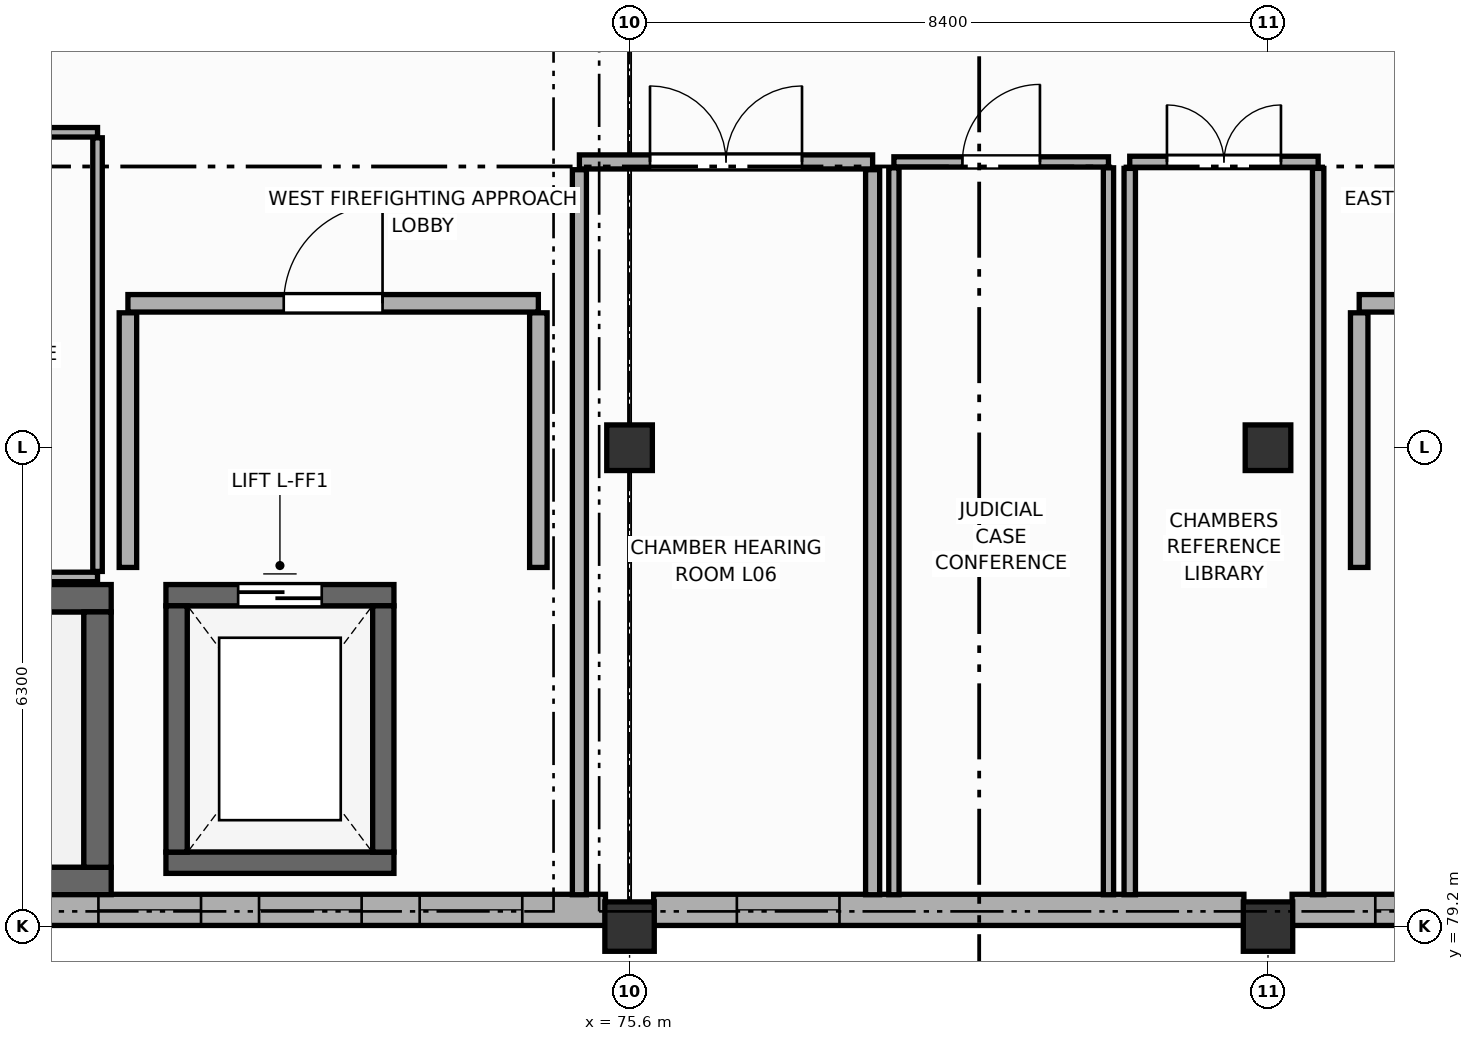
"""IFC4 building model, lengths in metres.
Left out: names, types, materials, properties, quantities, classifications, styles, units other than length and angle.
Written with IfcOpenShell. Run it as: python <this file> out.ifc"""

import sys

from ifc_helpers import new_model, si_unit, direction, frame, frame_2d, origin, origin_2d, place, context, subcontext, project, spatial, rectangle, extrude, element, fill, save


model = new_model("IFC4")
c1 = context("Model", 3, precision=1e-05, world=origin(), true_north=direction((0.0, 1.0)))
c2 = subcontext(c1, "Body", "Model", "MODEL_VIEW")
j1 = project(units=[si_unit("LENGTHUNIT", "METRE"), si_unit("PLANEANGLEUNIT", "RADIAN")], contexts=[c1])
p1 = place(None, origin())
s1 = spatial("IfcSite", under=j1, at=p1, CompositionType="ELEMENT")
p2 = place(p1, origin())
s2 = spatial("IfcBuilding", under=s1, at=p2, CompositionType="ELEMENT")
p3 = place(p2, frame((0.0, 0.0, 22.8)))
s3 = spatial("IfcBuildingStorey", under=s2, at=p3, CompositionType="ELEMENT", Elevation=22.8)
p4 = place(p3, frame((75.6, 79.2, 0.0), z_axis=(0.0, 0.0, 1.0), x_axis=(1.0, 0.0, 0.0)))
e1 = element("IfcColumn", 1, at=p4, inside=s3, PredefinedType="COLUMN", context=c2, shape_type="SweptSolid", body=[
    extrude(rectangle(XDim=0.65, YDim=0.65, at=origin_2d()), origin(), (0.0, 0.0, 1.0), 4.2),
])
p5 = place(p3, frame((75.6, 85.5, 0.0), z_axis=(0.0, 0.0, 1.0), x_axis=(1.0, 0.0, 0.0)))
e2 = element("IfcColumn", 2, at=p5, inside=s3, PredefinedType="COLUMN", context=c2, shape_type="SweptSolid", body=[
    extrude(rectangle(XDim=0.6, YDim=0.6, at=origin_2d()), origin(), (0.0, 0.0, 1.0), 4.2),
])
p6 = place(p3, frame((84.0, 79.2, 0.0), z_axis=(0.0, 0.0, 1.0), x_axis=(1.0, 0.0, 0.0)))
e3 = element("IfcColumn", 3, at=p6, inside=s3, PredefinedType="COLUMN", context=c2, shape_type="SweptSolid", body=[
    extrude(rectangle(XDim=0.65, YDim=0.65, at=origin_2d()), origin(), (0.0, 0.0, 1.0), 4.2),
])
p7 = place(p3, frame((84.0, 85.5, 0.0), z_axis=(0.0, 0.0, 1.0), x_axis=(1.0, 0.0, 0.0)))
e4 = element("IfcColumn", 4, at=p7, inside=s3, PredefinedType="COLUMN", context=c2, shape_type="SweptSolid", body=[
    extrude(rectangle(XDim=0.6, YDim=0.6, at=origin_2d()), origin(), (0.0, 0.0, 1.0), 4.2),
])
p8 = place(p3, frame((75.283, 79.42, 0.0), z_axis=(0.0, 0.0, 1.0), x_axis=(-1.0, 0.0, 0.0)))
e5 = element("IfcWall", 5, at=p8, inside=s3, PredefinedType="STANDARD", context=c2, shape_type="SweptSolid", body=[
    extrude(rectangle(XDim=7.766, YDim=0.41, at=frame_2d((3.883, 0.0))), origin(), (0.0, 0.0, 1.0), 3.5),
])
p9 = place(p8, frame((1.095, 0.0, 0.85)))
e6 = element("IfcOpeningElement", 6, at=p9, cuts=e5, PredefinedType="OPENING", context=c2, shape_type="SweptSolid", body=[
    extrude(rectangle(XDim=1.35, YDim=1.95, at=frame_2d((0.675, 0.975))), frame((0.0, 0.215, 0.0), z_axis=(0.0, -1.0, 0.0), x_axis=(1.0, 0.0, 0.0)), (0.0, 0.0, 1.0), 0.43),
])
p10 = place(p8, frame((3.208, 0.0, 0.85)))
e7 = element("IfcOpeningElement", 7, at=p10, cuts=e5, PredefinedType="OPENING", context=c2, shape_type="SweptSolid", body=[
    extrude(rectangle(XDim=1.35, YDim=1.95, at=frame_2d((0.675, 0.975))), frame((0.0, 0.215, 0.0), z_axis=(0.0, -1.0, 0.0), x_axis=(1.0, 0.0, 0.0)), (0.0, 0.0, 1.0), 0.43),
])
p11 = place(p8, frame((5.321, 0.0, 0.85)))
e8 = element("IfcOpeningElement", 8, at=p11, cuts=e5, PredefinedType="OPENING", context=c2, shape_type="SweptSolid", body=[
    extrude(rectangle(XDim=1.35, YDim=1.95, at=frame_2d((0.675, 0.975))), frame((0.0, 0.215, 0.0), z_axis=(0.0, -1.0, 0.0), x_axis=(1.0, 0.0, 0.0)), (0.0, 0.0, 1.0), 0.43),
])
p12 = place(p3, frame((83.683, 79.42, 0.0), z_axis=(0.0, 0.0, 1.0), x_axis=(-1.0, 0.0, 0.0)))
e9 = element("IfcWall", 9, at=p12, inside=s3, PredefinedType="STANDARD", context=c2, shape_type="SweptSolid", body=[
    extrude(rectangle(XDim=7.766, YDim=0.41, at=frame_2d((3.883, 0.0))), origin(), (0.0, 0.0, 1.0), 3.5),
])
p13 = place(p12, frame((5.321, 0.0, 0.85)))
e10 = element("IfcOpeningElement", 10, at=p13, cuts=e9, PredefinedType="OPENING", context=c2, shape_type="SweptSolid", body=[
    extrude(rectangle(XDim=1.35, YDim=1.95, at=frame_2d((0.675, 0.975))), frame((0.0, 0.215, 0.0), z_axis=(0.0, -1.0, 0.0), x_axis=(1.0, 0.0, 0.0)), (0.0, 0.0, 1.0), 0.43),
])
p14 = place(p3, frame((92.083, 79.42, 0.0), z_axis=(0.0, 0.0, 1.0), x_axis=(-1.0, 0.0, 0.0)))
e11 = element("IfcWall", 11, at=p14, inside=s3, PredefinedType="STANDARD", context=c2, shape_type="SweptSolid", body=[
    extrude(rectangle(XDim=7.766, YDim=0.41, at=frame_2d((3.883, 0.0))), origin(), (0.0, 0.0, 1.0), 3.5),
])
p15 = place(p14, frame((1.095, 0.0, 0.85)))
e12 = element("IfcOpeningElement", 12, at=p15, cuts=e11, PredefinedType="OPENING", context=c2, shape_type="SweptSolid", body=[
    extrude(rectangle(XDim=1.35, YDim=1.95, at=frame_2d((0.675, 0.975))), frame((0.0, 0.215, 0.0), z_axis=(0.0, -1.0, 0.0), x_axis=(1.0, 0.0, 0.0)), (0.0, 0.0, 1.0), 0.43),
])
p16 = place(p14, frame((3.208, 0.0, 0.85)))
e13 = element("IfcOpeningElement", 13, at=p16, cuts=e11, PredefinedType="OPENING", context=c2, shape_type="SweptSolid", body=[
    extrude(rectangle(XDim=1.35, YDim=1.95, at=frame_2d((0.675, 0.975))), frame((0.0, 0.215, 0.0), z_axis=(0.0, -1.0, 0.0), x_axis=(1.0, 0.0, 0.0)), (0.0, 0.0, 1.0), 0.43),
])
p17 = place(p14, frame((5.321, 0.0, 0.85)))
e14 = element("IfcOpeningElement", 14, at=p17, cuts=e11, PredefinedType="OPENING", context=c2, shape_type="SweptSolid", body=[
    extrude(rectangle(XDim=1.35, YDim=1.95, at=frame_2d((0.675, 0.975))), frame((0.0, 0.215, 0.0), z_axis=(0.0, -1.0, 0.0), x_axis=(1.0, 0.0, 0.0)), (0.0, 0.0, 1.0), 0.43),
])
for number, where, z_axis, x_axis in (
    (15, (59.42, 83.52, 0.0), (0.0, 0.0, 1.0), (1.0, 0.0, 0.0)),
    (16, (68.78, 79.8, 0.0), (0.0, 0.0, 1.0), (-1.0, 0.0, 0.0)),
):
    element("IfcWall", number, at=place(p3, frame(where, z_axis=z_axis, x_axis=x_axis)), inside=s3, PredefinedType="SHEAR", context=c2, shape_type="SweptSolid", body=[
        extrude(rectangle(XDim=9.36, YDim=0.36, at=frame_2d((4.68, 0.0))), origin(), (0.0, 0.0, 1.0), 3.97),
    ])
p18 = place(p3, frame((68.6, 83.34, 0.0), z_axis=(0.0, 0.0, 1.0), x_axis=(0.0, -1.0, 0.0)))
e17 = element("IfcWall", 17, at=p18, inside=s3, PredefinedType="SHEAR", context=c2, shape_type="SweptSolid", body=[
    extrude(rectangle(XDim=3.36, YDim=0.36, at=frame_2d((1.68, 0.0))), origin(), (0.0, 0.0, 1.0), 3.97),
])
p19 = place(p3, frame((69.5, 83.56, 0.0), z_axis=(0.0, 0.0, 1.0), x_axis=(1.0, 0.0, 0.0)))
e18 = element("IfcWall", 18, at=p19, inside=s3, PredefinedType="SHEAR", context=c2, shape_type="SweptSolid", body=[
    extrude(rectangle(XDim=3.0, YDim=0.28, at=frame_2d((1.5, 0.0))), origin(), (0.0, 0.0, 1.0), 3.97),
])
p20 = place(p19, frame((0.95, 0.0, 0.0)))
e19 = element("IfcOpeningElement", 19, at=p20, cuts=e18, PredefinedType="OPENING", context=c2, shape_type="SweptSolid", body=[
    extrude(rectangle(XDim=1.1, YDim=2.2, at=frame_2d((0.55, 1.1))), frame((0.0, 0.15, 0.0), z_axis=(0.0, -1.0, 0.0), x_axis=(1.0, 0.0, 0.0)), (0.0, 0.0, 1.0), 0.3),
])
p21 = place(p3, frame((72.5, 80.04, 0.0), z_axis=(0.0, 0.0, 1.0), x_axis=(-1.0, 0.0, 0.0)))
e20 = element("IfcWall", 20, at=p21, inside=s3, PredefinedType="SHEAR", context=c2, shape_type="SweptSolid", body=[
    extrude(rectangle(XDim=3.0, YDim=0.28, at=frame_2d((1.5, 0.0))), origin(), (0.0, 0.0, 1.0), 3.97),
])
for number, where, z_axis, x_axis in (
    (21, (69.64, 80.18, 0.0), (0.0, 0.0, 1.0), (0.0, 1.0, 0.0)),
    (22, (72.36, 83.42, 0.0), (0.0, 0.0, 1.0), (0.0, -1.0, 0.0)),
):
    element("IfcWall", number, at=place(p3, frame(where, z_axis=z_axis, x_axis=x_axis)), inside=s3, PredefinedType="SHEAR", context=c2, shape_type="SweptSolid", body=[
        extrude(rectangle(XDim=3.24, YDim=0.28, at=frame_2d((1.62, 0.0))), origin(), (0.0, 0.0, 1.0), 3.97),
    ])
p22 = place(p3, frame((69.0, 87.4, 0.0), z_axis=(0.0, 0.0, 1.0), x_axis=(1.0, 0.0, 0.0)))
e23 = element("IfcWall", 23, at=p22, inside=s3, PredefinedType="STANDARD", context=c2, shape_type="SweptSolid", body=[
    extrude(rectangle(XDim=5.4, YDim=0.23, at=frame_2d((2.7, 0.0))), origin(), (0.0, 0.0, 1.0), 3.955),
])
p23 = place(p22, frame((2.05, 0.0, 0.0)))
e24 = element("IfcOpeningElement", 24, at=p23, cuts=e23, PredefinedType="OPENING", context=c2, shape_type="SweptSolid", body=[
    extrude(rectangle(XDim=1.3, YDim=2.2, at=frame_2d((0.65, 1.1))), frame((0.0, 0.125, 0.0), z_axis=(0.0, -1.0, 0.0), x_axis=(1.0, 0.0, 0.0)), (0.0, 0.0, 1.0), 0.25),
])
for number, where, z_axis, x_axis in (
    (25, (69.0, 83.925, 0.0), (0.0, 0.0, 1.0), (0.0, 1.0, 0.0)),
    (26, (74.4, 87.275, 0.0), (0.0, 0.0, 1.0), (0.0, -1.0, 0.0)),
):
    element("IfcWall", number, at=place(p3, frame(where, z_axis=z_axis, x_axis=x_axis)), inside=s3, PredefinedType="STANDARD", context=c2, shape_type="SweptSolid", body=[
        extrude(rectangle(XDim=3.35, YDim=0.23, at=frame_2d((1.675, 0.0))), origin(), (0.0, 0.0, 1.0), 3.4),
    ])
p24 = place(p3, frame((85.2, 87.4, 0.0), z_axis=(0.0, 0.0, 1.0), x_axis=(1.0, 0.0, 0.0)))
e27 = element("IfcWall", 27, at=p24, inside=s3, PredefinedType="STANDARD", context=c2, shape_type="SweptSolid", body=[
    extrude(rectangle(XDim=5.4, YDim=0.23, at=frame_2d((2.7, 0.0))), origin(), (0.0, 0.0, 1.0), 3.955),
])
p25 = place(p24, frame((2.05, 0.0, 0.0)))
e28 = element("IfcOpeningElement", 28, at=p25, cuts=e27, PredefinedType="OPENING", context=c2, shape_type="SweptSolid", body=[
    extrude(rectangle(XDim=1.3, YDim=2.2, at=frame_2d((0.65, 1.1))), frame((0.0, 0.125, 0.0), z_axis=(0.0, -1.0, 0.0), x_axis=(1.0, 0.0, 0.0)), (0.0, 0.0, 1.0), 0.25),
])
p26 = place(p3, frame((85.2, 83.925, 0.0), z_axis=(0.0, 0.0, 1.0), x_axis=(0.0, 1.0, 0.0)))
e29 = element("IfcWall", 29, at=p26, inside=s3, PredefinedType="STANDARD", context=c2, shape_type="SweptSolid", body=[
    extrude(rectangle(XDim=3.35, YDim=0.23, at=frame_2d((1.675, 0.0))), origin(), (0.0, 0.0, 1.0), 3.4),
])
p27 = place(p3, frame((66.0, 89.65, 0.0), z_axis=(0.0, 0.0, 1.0), x_axis=(1.0, 0.0, 0.0)))
e30 = element("IfcWall", 30, at=p27, inside=s3, PredefinedType="PARTITIONING", context=c2, shape_type="SweptSolid", body=[
    extrude(rectangle(XDim=2.6, YDim=0.125, at=frame_2d((1.3, 0.0))), origin(), (0.0, 0.0, 1.0), 3.5),
])
p28 = place(p27, frame((0.8, 0.0, 0.0)))
e31 = element("IfcOpeningElement", 31, at=p28, cuts=e30, PredefinedType="OPENING", context=c2, shape_type="SweptSolid", body=[
    extrude(rectangle(XDim=1.0, YDim=2.1, at=frame_2d((0.5, 1.05))), frame((0.0, 0.073, 0.0), z_axis=(0.0, -1.0, 0.0), x_axis=(1.0, 0.0, 0.0)), (0.0, 0.0, 1.0), 0.145),
])
p29 = place(p3, frame((68.6, 83.8, 0.0), z_axis=(0.0, 0.0, 1.0), x_axis=(-1.0, 0.0, 0.0)))
e32 = element("IfcWall", 32, at=p29, inside=s3, PredefinedType="PARTITIONING", context=c2, shape_type="SweptSolid", body=[
    extrude(rectangle(XDim=2.6, YDim=0.125, at=frame_2d((1.3, 0.0))), origin(), (0.0, 0.0, 1.0), 3.5),
])
p30 = place(p3, frame((68.6, 89.577, 0.0), z_axis=(0.0, 0.0, 1.0), x_axis=(0.0, -1.0, 0.0)))
e33 = element("IfcWall", 33, at=p30, inside=s3, PredefinedType="PARTITIONING", context=c2, shape_type="SweptSolid", body=[
    extrude(rectangle(XDim=5.705, YDim=0.125, at=frame_2d((2.853, 0.0))), origin(), (0.0, 0.0, 1.0), 3.4),
])
p31 = place(p3, frame((74.94, 89.26, 0.0), z_axis=(0.0, 0.0, 1.0), x_axis=(1.0, 0.0, 0.0)))
e34 = element("IfcWall", 34, at=p31, inside=s3, PredefinedType="PARTITIONING", context=c2, shape_type="SweptSolid", body=[
    extrude(rectangle(XDim=3.858, YDim=0.185, at=frame_2d((1.929, 0.0))), origin(), (0.0, 0.0, 1.0), 3.5),
])
p32 = place(p31, frame((0.929, 0.0, 0.0)))
e35 = element("IfcOpeningElement", 35, at=p32, cuts=e34, PredefinedType="OPENING", context=c2, shape_type="SweptSolid", body=[
    extrude(rectangle(XDim=2.0, YDim=2.5, at=frame_2d((1.0, 1.25))), frame((0.0, 0.103, 0.0), z_axis=(0.0, -1.0, 0.0), x_axis=(1.0, 0.0, 0.0)), (0.0, 0.0, 1.0), 0.205),
])
for number, where, z_axis, x_axis in (
    (36, (74.94, 79.619, 0.0), (0.0, 0.0, 1.0), (0.0, 1.0, 0.0)),
    (37, (78.798, 89.157, 0.0), (0.0, 0.0, 1.0), (0.0, -1.0, 0.0)),
):
    element("IfcWall", number, at=place(p3, frame(where, z_axis=z_axis, x_axis=x_axis)), inside=s3, PredefinedType="PARTITIONING", context=c2, shape_type="SweptSolid", body=[
        extrude(rectangle(XDim=9.539, YDim=0.185, at=frame_2d((4.769, 0.0))), origin(), (0.0, 0.0, 1.0), 3.4),
    ])
p33 = place(p3, frame((79.078, 89.26, 0.0), z_axis=(0.0, 0.0, 1.0), x_axis=(1.0, 0.0, 0.0)))
e38 = element("IfcWall", 38, at=p33, inside=s3, PredefinedType="PARTITIONING", context=c2, shape_type="SweptSolid", body=[
    extrude(rectangle(XDim=2.823, YDim=0.135, at=frame_2d((1.412, 0.0))), origin(), (0.0, 0.0, 1.0), 3.955),
])
p34 = place(p33, frame((0.902, 0.0, 0.0)))
e39 = element("IfcOpeningElement", 39, at=p34, cuts=e38, PredefinedType="OPENING", context=c2, shape_type="SweptSolid", body=[
    extrude(rectangle(XDim=1.02, YDim=2.15, at=frame_2d((0.51, 1.075))), frame((0.0, 0.077, 0.0), z_axis=(0.0, -1.0, 0.0), x_axis=(1.0, 0.0, 0.0)), (0.0, 0.0, 1.0), 0.155),
])
for number, where, z_axis, x_axis in (
    (40, (79.078, 79.619, 0.0), (0.0, 0.0, 1.0), (0.0, 1.0, 0.0)),
    (41, (81.901, 89.183, 0.0), (0.0, 0.0, 1.0), (0.0, -1.0, 0.0)),
):
    element("IfcWall", number, at=place(p3, frame(where, z_axis=z_axis, x_axis=x_axis)), inside=s3, PredefinedType="PARTITIONING", context=c2, shape_type="SweptSolid", body=[
        extrude(rectangle(XDim=9.564, YDim=0.135, at=frame_2d((4.782, 0.0))), origin(), (0.0, 0.0, 1.0), 3.4),
    ])
p35 = place(p3, frame((82.181, 89.26, 0.0), z_axis=(0.0, 0.0, 1.0), x_axis=(1.0, 0.0, 0.0)))
e42 = element("IfcWall", 42, at=p35, inside=s3, PredefinedType="PARTITIONING", context=c2, shape_type="SweptSolid", body=[
    extrude(rectangle(XDim=2.479, YDim=0.15, at=frame_2d((1.24, 0.0))), origin(), (0.0, 0.0, 1.0), 3.5),
])
p36 = place(p35, frame((0.49, 0.0, 0.0)))
e43 = element("IfcOpeningElement", 43, at=p36, cuts=e42, PredefinedType="OPENING", context=c2, shape_type="SweptSolid", body=[
    extrude(rectangle(XDim=1.5, YDim=2.35, at=frame_2d((0.75, 1.175))), frame((0.0, 0.085, 0.0), z_axis=(0.0, -1.0, 0.0), x_axis=(1.0, 0.0, 0.0)), (0.0, 0.0, 1.0), 0.17),
])
for number, where, z_axis, x_axis in (
    (44, (82.181, 79.619, 0.0), (0.0, 0.0, 1.0), (0.0, 1.0, 0.0)),
    (45, (84.66, 89.175, 0.0), (0.0, 0.0, 1.0), (0.0, -1.0, 0.0)),
):
    element("IfcWall", number, at=place(p3, frame(where, z_axis=z_axis, x_axis=x_axis)), inside=s3, PredefinedType="PARTITIONING", context=c2, shape_type="SweptSolid", body=[
        extrude(rectangle(XDim=9.556, YDim=0.15, at=frame_2d((4.778, 0.0))), origin(), (0.0, 0.0, 1.0), 3.4),
    ])
p37 = place(p9, origin())
e46 = element("IfcWindow", 46, at=p37, inside=s3, PartitioningType="SINGLE_PANEL", PredefinedType="WINDOW", context=c2, shape_type="SweptSolid", body=[
    extrude(rectangle(XDim=1.35, YDim=1.95, at=frame_2d((0.675, 0.975))), frame((0.0, 0.03, 0.0), z_axis=(0.0, -1.0, 0.0), x_axis=(1.0, 0.0, 0.0)), (0.0, 0.0, 1.0), 0.06),
])
fill(e6, e46)
p38 = place(p10, origin())
e47 = element("IfcWindow", 47, at=p38, inside=s3, PartitioningType="SINGLE_PANEL", PredefinedType="WINDOW", context=c2, shape_type="SweptSolid", body=[
    extrude(rectangle(XDim=1.35, YDim=1.95, at=frame_2d((0.675, 0.975))), frame((0.0, 0.03, 0.0), z_axis=(0.0, -1.0, 0.0), x_axis=(1.0, 0.0, 0.0)), (0.0, 0.0, 1.0), 0.06),
])
fill(e7, e47)
p39 = place(p11, origin())
e48 = element("IfcWindow", 48, at=p39, inside=s3, PartitioningType="SINGLE_PANEL", PredefinedType="WINDOW", context=c2, shape_type="SweptSolid", body=[
    extrude(rectangle(XDim=1.35, YDim=1.95, at=frame_2d((0.675, 0.975))), frame((0.0, 0.03, 0.0), z_axis=(0.0, -1.0, 0.0), x_axis=(1.0, 0.0, 0.0)), (0.0, 0.0, 1.0), 0.06),
])
fill(e8, e48)
p40 = place(p13, origin())
e49 = element("IfcWindow", 49, at=p40, inside=s3, PartitioningType="SINGLE_PANEL", PredefinedType="WINDOW", context=c2, shape_type="SweptSolid", body=[
    extrude(rectangle(XDim=1.35, YDim=1.95, at=frame_2d((0.675, 0.975))), frame((0.0, 0.03, 0.0), z_axis=(0.0, -1.0, 0.0), x_axis=(1.0, 0.0, 0.0)), (0.0, 0.0, 1.0), 0.06),
])
fill(e10, e49)
p41 = place(p17, origin())
e50 = element("IfcWindow", 50, at=p41, inside=s3, PartitioningType="SINGLE_PANEL", PredefinedType="WINDOW", context=c2, shape_type="SweptSolid", body=[
    extrude(rectangle(XDim=1.35, YDim=1.95, at=frame_2d((0.675, 0.975))), frame((0.0, 0.03, 0.0), z_axis=(0.0, -1.0, 0.0), x_axis=(1.0, 0.0, 0.0)), (0.0, 0.0, 1.0), 0.06),
])
fill(e14, e50)
p42 = place(p20, origin())
e51 = element("IfcDoor", 51, at=p42, inside=s3, OperationType="DOUBLE_DOOR_SLIDING", PredefinedType="DOOR", context=c2, shape_type="SweptSolid", body=[
    extrude(rectangle(XDim=1.1, YDim=2.2, at=frame_2d((0.55, 1.1))), frame((0.0, 0.025, 0.0), z_axis=(0.0, -1.0, 0.0), x_axis=(1.0, 0.0, 0.0)), (0.0, 0.0, 1.0), 0.05),
])
fill(e19, e51)
p43 = place(p23, origin())
e52 = element("IfcDoor", 52, at=p43, inside=s3, OperationType="SINGLE_SWING_RIGHT", PredefinedType="DOOR", context=c2, shape_type="SweptSolid", body=[
    extrude(rectangle(XDim=1.3, YDim=2.2, at=frame_2d((0.65, 1.1))), frame((0.0, 0.025, 0.0), z_axis=(0.0, -1.0, 0.0), x_axis=(1.0, 0.0, 0.0)), (0.0, 0.0, 1.0), 0.05),
])
fill(e24, e52)
p44 = place(p32, origin())
e53 = element("IfcDoor", 53, at=p44, inside=s3, OperationType="DOUBLE_DOOR_SINGLE_SWING", PredefinedType="DOOR", context=c2, shape_type="SweptSolid", body=[
    extrude(rectangle(XDim=2.0, YDim=2.5, at=frame_2d((1.0, 1.25))), frame((0.0, 0.025, 0.0), z_axis=(0.0, -1.0, 0.0), x_axis=(1.0, 0.0, 0.0)), (0.0, 0.0, 1.0), 0.05),
])
fill(e35, e53)
p45 = place(p34, origin())
e54 = element("IfcDoor", 54, at=p45, inside=s3, OperationType="SINGLE_SWING_RIGHT", PredefinedType="DOOR", context=c2, shape_type="SweptSolid", body=[
    extrude(rectangle(XDim=1.02, YDim=2.15, at=frame_2d((0.51, 1.075))), frame((0.0, 0.025, 0.0), z_axis=(0.0, -1.0, 0.0), x_axis=(1.0, 0.0, 0.0)), (0.0, 0.0, 1.0), 0.05),
])
fill(e39, e54)
p46 = place(p36, origin())
e55 = element("IfcDoor", 55, at=p46, inside=s3, OperationType="DOUBLE_DOOR_SINGLE_SWING", PredefinedType="DOOR", context=c2, shape_type="SweptSolid", body=[
    extrude(rectangle(XDim=1.5, YDim=2.35, at=frame_2d((0.75, 1.175))), frame((0.0, 0.025, 0.0), z_axis=(0.0, -1.0, 0.0), x_axis=(1.0, 0.0, 0.0)), (0.0, 0.0, 1.0), 0.05),
])
fill(e43, e55)
save(model, sys.argv[1])
